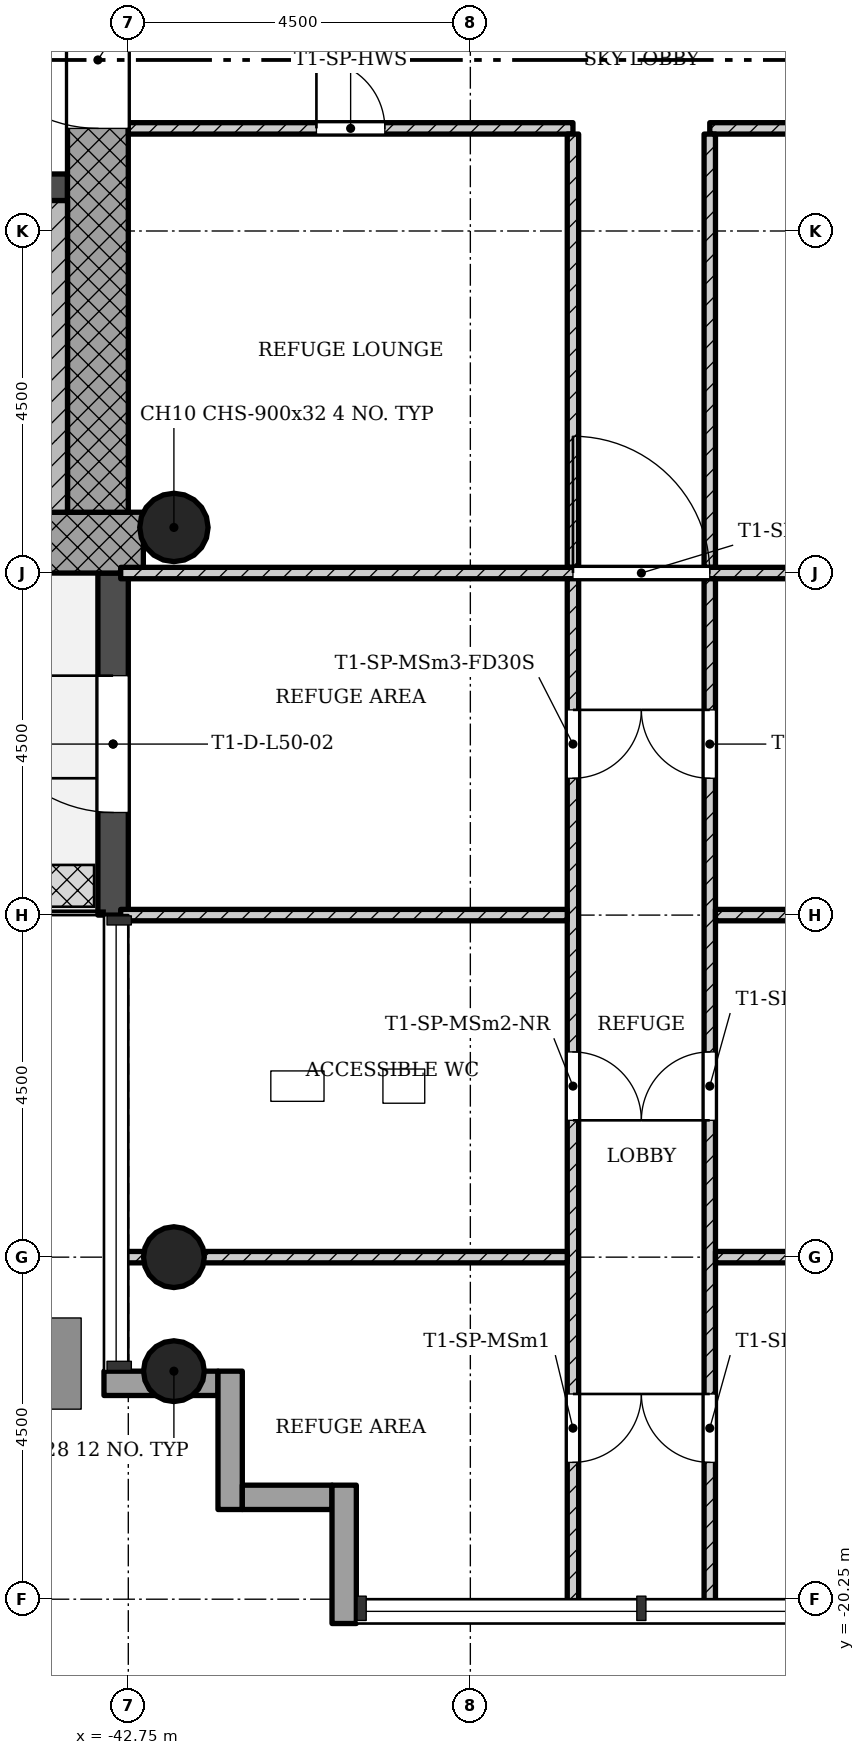
"""IFC4 building model, lengths in metres.
Left out: names, types, materials, properties, quantities, classifications, styles, units other than length and angle.
Written with IfcOpenShell. Run it as: python <this file> out.ifc"""

import sys

from ifc_helpers import new_model, si_unit, direction, frame, frame_2d, origin, origin_2d, place, context, subcontext, project, spatial, rectangle, hollow_circle, extrude, element, fill, save


model = new_model("IFC4")
c1 = context("Model", 3, precision=1e-05, world=origin(), true_north=direction((0.0, 1.0)))
c2 = subcontext(c1, "Body", "Model", "MODEL_VIEW")
j1 = project(units=[si_unit("LENGTHUNIT", "METRE"), si_unit("PLANEANGLEUNIT", "RADIAN")], contexts=[c1])
p1 = place(None, origin())
s1 = spatial("IfcSite", under=j1, at=p1, CompositionType="ELEMENT")
p2 = place(p1, origin())
s2 = spatial("IfcBuilding", under=s1, at=p2, CompositionType="ELEMENT")
p3 = place(p2, frame((0.0, 0.0, 181.3)))
s3 = spatial("IfcBuildingStorey", under=s2, at=p3, CompositionType="ELEMENT", Elevation=181.3)
p4 = place(p3, frame((-50.95, -6.35, 0.0), z_axis=(0.0, 0.0, 1.0), x_axis=(1.0, 0.0, 0.0)))
e1 = element("IfcWall", 1, at=p4, inside=s3, PredefinedType="SHEAR", context=c2, shape_type="SweptSolid", body=[
    extrude(rectangle(XDim=8.398, YDim=0.8, at=frame_2d((4.199, 0.0))), origin(), (0.0, 0.0, 1.0), 4.5),
])
p5 = place(p3, frame((-43.15, -5.95, 0.0), z_axis=(0.0, 0.0, 1.0), x_axis=(0.0, 1.0, 0.0)))
e2 = element("IfcWall", 2, at=p5, inside=s3, PredefinedType="SHEAR", context=c2, shape_type="SweptSolid", body=[
    extrude(rectangle(XDim=12.7, YDim=0.8, at=frame_2d((6.35, 0.0))), origin(), (0.0, 0.0, 1.0), 4.5),
])
p6 = place(p5, frame((5.05, 0.0, 0.0)))
e3 = element("IfcOpeningElement", 3, at=p6, cuts=e2, PredefinedType="OPENING", context=c2, shape_type="SweptSolid", body=[
    extrude(rectangle(XDim=1.8, YDim=2.1, at=frame_2d((0.9, 1.05))), frame((0.0, 0.41, 0.0), z_axis=(0.0, -1.0, 0.0), x_axis=(1.0, 0.0, 0.0)), (0.0, 0.0, 1.0), 0.82),
])
p7 = place(p3, frame((-50.95, -1.675, 0.0), z_axis=(0.0, 0.0, 1.0), x_axis=(1.0, 0.0, 0.0)))
e4 = element("IfcWall", 4, at=p7, inside=s3, PredefinedType="SHEAR", context=c2, shape_type="SweptSolid", body=[
    extrude(rectangle(XDim=7.4, YDim=0.35, at=frame_2d((3.7, 0.0))), origin(), (0.0, 0.0, 1.0), 4.5),
])
p8 = place(p7, frame((5.65, 0.0, 0.0)))
e5 = element("IfcOpeningElement", 5, at=p8, cuts=e4, PredefinedType="OPENING", context=c2, shape_type="SweptSolid", body=[
    extrude(rectangle(XDim=0.9, YDim=2.1, at=frame_2d((0.45, 1.05))), frame((0.0, 0.185, 0.0), z_axis=(0.0, -1.0, 0.0), x_axis=(1.0, 0.0, 0.0)), (0.0, 0.0, 1.0), 0.37),
])
for number, where, z_axis, x_axis in (
    (6, (-42.15, -15.75, 0.0), (0.0, 0.0, 1.0), (1.0, 0.0, 0.0)),
    (7, (-42.15, -17.25, 0.0), (0.0, 0.0, 1.0), (1.0, 0.0, 0.0)),
):
    element("IfcColumn", number, at=place(p3, frame(where, z_axis=z_axis, x_axis=x_axis)), inside=s3, PredefinedType="COLUMN", context=c2, shape_type="SweptSolid", body=[
        extrude(hollow_circle(Radius=0.4, WallThickness=0.028, at=origin_2d()), origin(), (0.0, 0.0, 1.0), 4.5),
    ])
p9 = place(p3, frame((-42.15, -6.15, 0.0), z_axis=(0.0, 0.0, 1.0), x_axis=(1.0, 0.0, 0.0)))
e8 = element("IfcColumn", 8, at=p9, inside=s3, PredefinedType="COLUMN", context=c2, shape_type="SweptSolid", body=[
    extrude(hollow_circle(Radius=0.45, WallThickness=0.032, at=origin_2d()), origin(), (0.0, 0.0, 1.0), 4.5),
])
p10 = place(p3, frame((-42.95, -6.75, -0.02), z_axis=(0.0, 0.0, 1.0), x_axis=(0.0, -1.0, 0.0)))
e9 = element("IfcWall", 9, at=p10, inside=s3, PredefinedType="STANDARD", context=c2, shape_type="SweptSolid", body=[
    extrude(rectangle(XDim=4.5, YDim=0.4, at=frame_2d((2.25, 0.0))), origin(), (0.0, 0.0, 1.0), 4.22),
])
p11 = place(p10, frame((1.35, 0.0, 0.02)))
e10 = element("IfcOpeningElement", 10, at=p11, cuts=e9, PredefinedType="OPENING", context=c2, shape_type="SweptSolid", body=[
    extrude(rectangle(XDim=1.8, YDim=2.1, at=frame_2d((0.9, 1.05))), frame((0.0, 0.21, 0.0), z_axis=(0.0, -1.0, 0.0), x_axis=(1.0, 0.0, 0.0)), (0.0, 0.0, 1.0), 0.42),
])
p12 = place(p3, frame((-43.07, -17.41, -0.3), z_axis=(0.0, 0.0, 1.0), x_axis=(1.0, 0.0, 0.0)))
e11 = element("IfcWall", 11, at=p12, inside=s3, PredefinedType="STANDARD", context=c2, shape_type="SweptSolid", body=[
    extrude(rectangle(XDim=1.5, YDim=0.32, at=frame_2d((0.75, 0.0))), origin(), (0.0, 0.0, 1.0), 4.5),
])
p13 = place(p3, frame((-41.41, -17.25, -0.3), z_axis=(0.0, 0.0, 1.0), x_axis=(0.0, -1.0, 0.0)))
e12 = element("IfcWall", 12, at=p13, inside=s3, PredefinedType="STANDARD", context=c2, shape_type="SweptSolid", body=[
    extrude(rectangle(XDim=1.82, YDim=0.32, at=frame_2d((0.91, 0.0))), origin(), (0.0, 0.0, 1.0), 4.5),
])
p14 = place(p3, frame((-41.25, -18.91, -0.3), z_axis=(0.0, 0.0, 1.0), x_axis=(1.0, 0.0, 0.0)))
e13 = element("IfcWall", 13, at=p14, inside=s3, PredefinedType="STANDARD", context=c2, shape_type="SweptSolid", body=[
    extrude(rectangle(XDim=1.18, YDim=0.32, at=frame_2d((0.59, 0.0))), origin(), (0.0, 0.0, 1.0), 4.5),
])
p15 = place(p3, frame((-39.91, -18.75, -0.3), z_axis=(0.0, 0.0, 1.0), x_axis=(0.0, -1.0, 0.0)))
e14 = element("IfcWall", 14, at=p15, inside=s3, PredefinedType="STANDARD", context=c2, shape_type="SweptSolid", body=[
    extrude(rectangle(XDim=1.82, YDim=0.32, at=frame_2d((0.91, 0.0))), origin(), (0.0, 0.0, 1.0), 4.5),
])
p16 = place(p3, frame((-35.1, -0.9, 0.0), z_axis=(0.0, 0.0, 1.0), x_axis=(1.0, 0.0, 0.0)))
e15 = element("IfcWall", 15, at=p16, inside=s3, PredefinedType="PARTITIONING", context=c2, shape_type="SweptSolid", body=[
    extrude(rectangle(XDim=5.85, YDim=0.15, at=frame_2d((2.925, 0.0))), origin(), (0.0, 0.0, 1.0), 4.08),
])
p17 = place(p16, frame((2.475, 0.0, 0.0)))
e16 = element("IfcOpeningElement", 16, at=p17, cuts=e15, PredefinedType="OPENING", context=c2, shape_type="SweptSolid", body=[
    extrude(rectangle(XDim=0.9, YDim=2.1, at=frame_2d((0.45, 1.05))), frame((0.0, 0.085, 0.0), z_axis=(0.0, -1.0, 0.0), x_axis=(1.0, 0.0, 0.0)), (0.0, 0.0, 1.0), 0.17),
])
p18 = place(p3, frame((-35.1, -6.675, 0.0), z_axis=(0.0, 0.0, 1.0), x_axis=(0.0, 1.0, 0.0)))
e17 = element("IfcWall", 17, at=p18, inside=s3, PredefinedType="PARTITIONING", context=c2, shape_type="SweptSolid", body=[
    extrude(rectangle(XDim=5.7, YDim=0.15, at=frame_2d((2.85, 0.0))), origin(), (0.0, 0.0, 1.0), 4.08),
])
p19 = place(p3, frame((-42.75, -0.9, 0.0), z_axis=(0.0, 0.0, 1.0), x_axis=(1.0, 0.0, 0.0)))
e18 = element("IfcWall", 18, at=p19, inside=s3, PredefinedType="PARTITIONING", context=c2, shape_type="SweptSolid", body=[
    extrude(rectangle(XDim=5.85, YDim=0.15, at=frame_2d((2.925, 0.0))), origin(), (0.0, 0.0, 1.0), 4.08),
])
p20 = place(p19, frame((2.475, 0.0, 0.0)))
e19 = element("IfcOpeningElement", 19, at=p20, cuts=e18, PredefinedType="OPENING", context=c2, shape_type="SweptSolid", body=[
    extrude(rectangle(XDim=0.9, YDim=2.1, at=frame_2d((0.45, 1.05))), frame((0.0, 0.085, 0.0), z_axis=(0.0, -1.0, 0.0), x_axis=(1.0, 0.0, 0.0)), (0.0, 0.0, 1.0), 0.17),
])
p21 = place(p3, frame((-36.9, -6.675, 0.0), z_axis=(0.0, 0.0, 1.0), x_axis=(0.0, 1.0, 0.0)))
e20 = element("IfcWall", 20, at=p21, inside=s3, PredefinedType="PARTITIONING", context=c2, shape_type="SweptSolid", body=[
    extrude(rectangle(XDim=5.7, YDim=0.15, at=frame_2d((2.85, 0.0))), origin(), (0.0, 0.0, 1.0), 4.08),
])
p22 = place(p3, frame((-42.85, -6.75, 0.0), z_axis=(0.0, 0.0, 1.0), x_axis=(1.0, 0.0, 0.0)))
e21 = element("IfcWall", 21, at=p22, inside=s3, PredefinedType="PARTITIONING", context=c2, shape_type="SweptSolid", body=[
    extrude(rectangle(XDim=13.7, YDim=0.15, at=frame_2d((6.85, 0.0))), origin(), (0.0, 0.0, 1.0), 4.08),
])
p23 = place(p22, frame((5.95, 0.0, 0.0)))
e22 = element("IfcOpeningElement", 22, at=p23, cuts=e21, PredefinedType="OPENING", context=c2, shape_type="SweptSolid", body=[
    extrude(rectangle(XDim=1.8, YDim=2.1, at=frame_2d((0.9, 1.05))), frame((0.0, 0.085, 0.0), z_axis=(0.0, -1.0, 0.0), x_axis=(1.0, 0.0, 0.0)), (0.0, 0.0, 1.0), 0.17),
])
p24 = place(p3, frame((-35.1, -20.35, 0.0), z_axis=(0.0, 0.0, 1.0), x_axis=(0.0, 1.0, 0.0)))
e23 = element("IfcWall", 23, at=p24, inside=s3, PredefinedType="PARTITIONING", context=c2, shape_type="SweptSolid", body=[
    extrude(rectangle(XDim=13.525, YDim=0.15, at=frame_2d((6.763, 0.0))), origin(), (0.0, 0.0, 1.0), 4.08),
])
p25 = place(p24, frame((1.9, 0.0, 0.0)))
e24 = element("IfcOpeningElement", 24, at=p25, cuts=e23, PredefinedType="OPENING", context=c2, shape_type="SweptSolid", body=[
    extrude(rectangle(XDim=0.9, YDim=2.1, at=frame_2d((0.45, 1.05))), frame((0.0, 0.085, 0.0), z_axis=(0.0, -1.0, 0.0), x_axis=(1.0, 0.0, 0.0)), (0.0, 0.0, 1.0), 0.17),
])
p26 = place(p24, frame((6.4, 0.0, 0.0)))
e25 = element("IfcOpeningElement", 25, at=p26, cuts=e23, PredefinedType="OPENING", context=c2, shape_type="SweptSolid", body=[
    extrude(rectangle(XDim=0.9, YDim=2.1, at=frame_2d((0.45, 1.05))), frame((0.0, 0.085, 0.0), z_axis=(0.0, -1.0, 0.0), x_axis=(1.0, 0.0, 0.0)), (0.0, 0.0, 1.0), 0.17),
])
p27 = place(p24, frame((10.9, 0.0, 0.0)))
e26 = element("IfcOpeningElement", 26, at=p27, cuts=e23, PredefinedType="OPENING", context=c2, shape_type="SweptSolid", body=[
    extrude(rectangle(XDim=0.9, YDim=2.1, at=frame_2d((0.45, 1.05))), frame((0.0, 0.085, 0.0), z_axis=(0.0, -1.0, 0.0), x_axis=(1.0, 0.0, 0.0)), (0.0, 0.0, 1.0), 0.17),
])
for number, where, z_axis, x_axis in (
    (27, (-35.025, -15.75, 0.0), (0.0, 0.0, 1.0), (1.0, 0.0, 0.0)),
    (28, (-35.025, -11.25, 0.0), (0.0, 0.0, 1.0), (1.0, 0.0, 0.0)),
):
    element("IfcWall", number, at=place(p3, frame(where, z_axis=z_axis, x_axis=x_axis)), inside=s3, PredefinedType="PARTITIONING", context=c2, shape_type="SweptSolid", body=[
        extrude(rectangle(XDim=5.875, YDim=0.15, at=frame_2d((2.938, 0.0))), origin(), (0.0, 0.0, 1.0), 4.08),
    ])
p28 = place(p3, frame((-36.9, -20.35, 0.0), z_axis=(0.0, 0.0, 1.0), x_axis=(0.0, 1.0, 0.0)))
e29 = element("IfcWall", 29, at=p28, inside=s3, PredefinedType="PARTITIONING", context=c2, shape_type="SweptSolid", body=[
    extrude(rectangle(XDim=13.525, YDim=0.15, at=frame_2d((6.763, 0.0))), origin(), (0.0, 0.0, 1.0), 4.08),
])
p29 = place(p28, frame((1.9, 0.0, 0.0)))
e30 = element("IfcOpeningElement", 30, at=p29, cuts=e29, PredefinedType="OPENING", context=c2, shape_type="SweptSolid", body=[
    extrude(rectangle(XDim=0.9, YDim=2.1, at=frame_2d((0.45, 1.05))), frame((0.0, 0.085, 0.0), z_axis=(0.0, -1.0, 0.0), x_axis=(1.0, 0.0, 0.0)), (0.0, 0.0, 1.0), 0.17),
])
p30 = place(p28, frame((6.4, 0.0, 0.0)))
e31 = element("IfcOpeningElement", 31, at=p30, cuts=e29, PredefinedType="OPENING", context=c2, shape_type="SweptSolid", body=[
    extrude(rectangle(XDim=0.9, YDim=2.1, at=frame_2d((0.45, 1.05))), frame((0.0, 0.085, 0.0), z_axis=(0.0, -1.0, 0.0), x_axis=(1.0, 0.0, 0.0)), (0.0, 0.0, 1.0), 0.17),
])
p31 = place(p28, frame((10.9, 0.0, 0.0)))
e32 = element("IfcOpeningElement", 32, at=p31, cuts=e29, PredefinedType="OPENING", context=c2, shape_type="SweptSolid", body=[
    extrude(rectangle(XDim=0.9, YDim=2.1, at=frame_2d((0.45, 1.05))), frame((0.0, 0.085, 0.0), z_axis=(0.0, -1.0, 0.0), x_axis=(1.0, 0.0, 0.0)), (0.0, 0.0, 1.0), 0.17),
])
for number, where, z_axis, x_axis in (
    (33, (-36.975, -15.75, 0.0), (0.0, 0.0, 1.0), (-1.0, 0.0, 0.0)),
    (34, (-36.975, -11.25, 0.0), (0.0, 0.0, 1.0), (-1.0, 0.0, 0.0)),
):
    element("IfcWall", number, at=place(p3, frame(where, z_axis=z_axis, x_axis=x_axis)), inside=s3, PredefinedType="PARTITIONING", context=c2, shape_type="SweptSolid", body=[
        extrude(rectangle(XDim=5.875, YDim=0.15, at=frame_2d((2.938, 0.0))), origin(), (0.0, 0.0, 1.0), 4.08),
    ])
p32 = place(p3, frame((-43.75, -1.85, 0.0), z_axis=(0.0, 0.0, 1.0), x_axis=(0.0, -1.0, 0.0)))
e35 = element("IfcWall", 35, at=p32, inside=s3, PredefinedType="SHEAR", context=c2, shape_type="SweptSolid", body=[
    extrude(rectangle(XDim=4.1, YDim=0.4, at=frame_2d((2.05, 0.0))), origin(), (0.0, 0.0, 1.0), 4.5),
])
p33 = place(p11, origin())
e36 = element("IfcDoor", 36, at=p33, inside=s3, OperationType="SINGLE_SWING_LEFT", PredefinedType="DOOR", context=c2, shape_type="SweptSolid", body=[
    extrude(rectangle(XDim=1.8, YDim=2.1, at=frame_2d((0.9, 1.05))), frame((0.0, 0.025, 0.0), z_axis=(0.0, -1.0, 0.0), x_axis=(1.0, 0.0, 0.0)), (0.0, 0.0, 1.0), 0.05),
])
fill(e10, e36)
p34 = place(p20, origin())
e37 = element("IfcDoor", 37, at=p34, inside=s3, OperationType="SINGLE_SWING_RIGHT", PredefinedType="DOOR", context=c2, shape_type="SweptSolid", body=[
    extrude(rectangle(XDim=0.9, YDim=2.1, at=frame_2d((0.45, 1.05))), frame((0.0, 0.025, 0.0), z_axis=(0.0, -1.0, 0.0), x_axis=(1.0, 0.0, 0.0)), (0.0, 0.0, 1.0), 0.05),
])
fill(e19, e37)
p35 = place(p23, origin())
e38 = element("IfcDoor", 38, at=p35, inside=s3, OperationType="SINGLE_SWING_RIGHT", PredefinedType="DOOR", context=c2, shape_type="SweptSolid", body=[
    extrude(rectangle(XDim=1.8, YDim=2.1, at=frame_2d((0.9, 1.05))), frame((0.0, 0.025, 0.0), z_axis=(0.0, -1.0, 0.0), x_axis=(1.0, 0.0, 0.0)), (0.0, 0.0, 1.0), 0.05),
])
fill(e22, e38)
p36 = place(p25, origin())
e39 = element("IfcDoor", 39, at=p36, inside=s3, OperationType="SINGLE_SWING_LEFT", PredefinedType="DOOR", context=c2, shape_type="SweptSolid", body=[
    extrude(rectangle(XDim=0.9, YDim=2.1, at=frame_2d((0.45, 1.05))), frame((0.0, 0.025, 0.0), z_axis=(0.0, -1.0, 0.0), x_axis=(1.0, 0.0, 0.0)), (0.0, 0.0, 1.0), 0.05),
])
fill(e24, e39)
p37 = place(p26, origin())
e40 = element("IfcDoor", 40, at=p37, inside=s3, OperationType="SINGLE_SWING_RIGHT", PredefinedType="DOOR", context=c2, shape_type="SweptSolid", body=[
    extrude(rectangle(XDim=0.9, YDim=2.1, at=frame_2d((0.45, 1.05))), frame((0.0, 0.025, 0.0), z_axis=(0.0, -1.0, 0.0), x_axis=(1.0, 0.0, 0.0)), (0.0, 0.0, 1.0), 0.05),
])
fill(e25, e40)
p38 = place(p27, origin())
e41 = element("IfcDoor", 41, at=p38, inside=s3, OperationType="SINGLE_SWING_LEFT", PredefinedType="DOOR", context=c2, shape_type="SweptSolid", body=[
    extrude(rectangle(XDim=0.9, YDim=2.1, at=frame_2d((0.45, 1.05))), frame((0.0, 0.025, 0.0), z_axis=(0.0, -1.0, 0.0), x_axis=(1.0, 0.0, 0.0)), (0.0, 0.0, 1.0), 0.05),
])
fill(e26, e41)
p39 = place(p29, origin())
e42 = element("IfcDoor", 42, at=p39, inside=s3, OperationType="SINGLE_SWING_RIGHT", PredefinedType="DOOR", context=c2, shape_type="SweptSolid", body=[
    extrude(rectangle(XDim=0.9, YDim=2.1, at=frame_2d((0.45, 1.05))), frame((0.0, 0.025, 0.0), z_axis=(0.0, -1.0, 0.0), x_axis=(1.0, 0.0, 0.0)), (0.0, 0.0, 1.0), 0.05),
])
fill(e30, e42)
p40 = place(p30, origin())
e43 = element("IfcDoor", 43, at=p40, inside=s3, OperationType="SINGLE_SWING_LEFT", PredefinedType="DOOR", context=c2, shape_type="SweptSolid", body=[
    extrude(rectangle(XDim=0.9, YDim=2.1, at=frame_2d((0.45, 1.05))), frame((0.0, 0.025, 0.0), z_axis=(0.0, -1.0, 0.0), x_axis=(1.0, 0.0, 0.0)), (0.0, 0.0, 1.0), 0.05),
])
fill(e31, e43)
p41 = place(p31, origin())
e44 = element("IfcDoor", 44, at=p41, inside=s3, OperationType="SINGLE_SWING_RIGHT", PredefinedType="DOOR", context=c2, shape_type="SweptSolid", body=[
    extrude(rectangle(XDim=0.9, YDim=2.1, at=frame_2d((0.45, 1.05))), frame((0.0, 0.025, 0.0), z_axis=(0.0, -1.0, 0.0), x_axis=(1.0, 0.0, 0.0)), (0.0, 0.0, 1.0), 0.05),
])
fill(e32, e44)
p42 = place(p6, origin())
e45 = element("IfcDoor", 45, at=p42, inside=s3, OperationType="SINGLE_SWING_LEFT", PredefinedType="DOOR", context=c2, shape_type="SweptSolid", body=[
    extrude(rectangle(XDim=1.8, YDim=2.1, at=frame_2d((0.9, 1.05))), frame((0.0, 0.025, 0.0), z_axis=(0.0, -1.0, 0.0), x_axis=(1.0, 0.0, 0.0)), (0.0, 0.0, 1.0), 0.05),
])
fill(e3, e45)
save(model, sys.argv[1])
